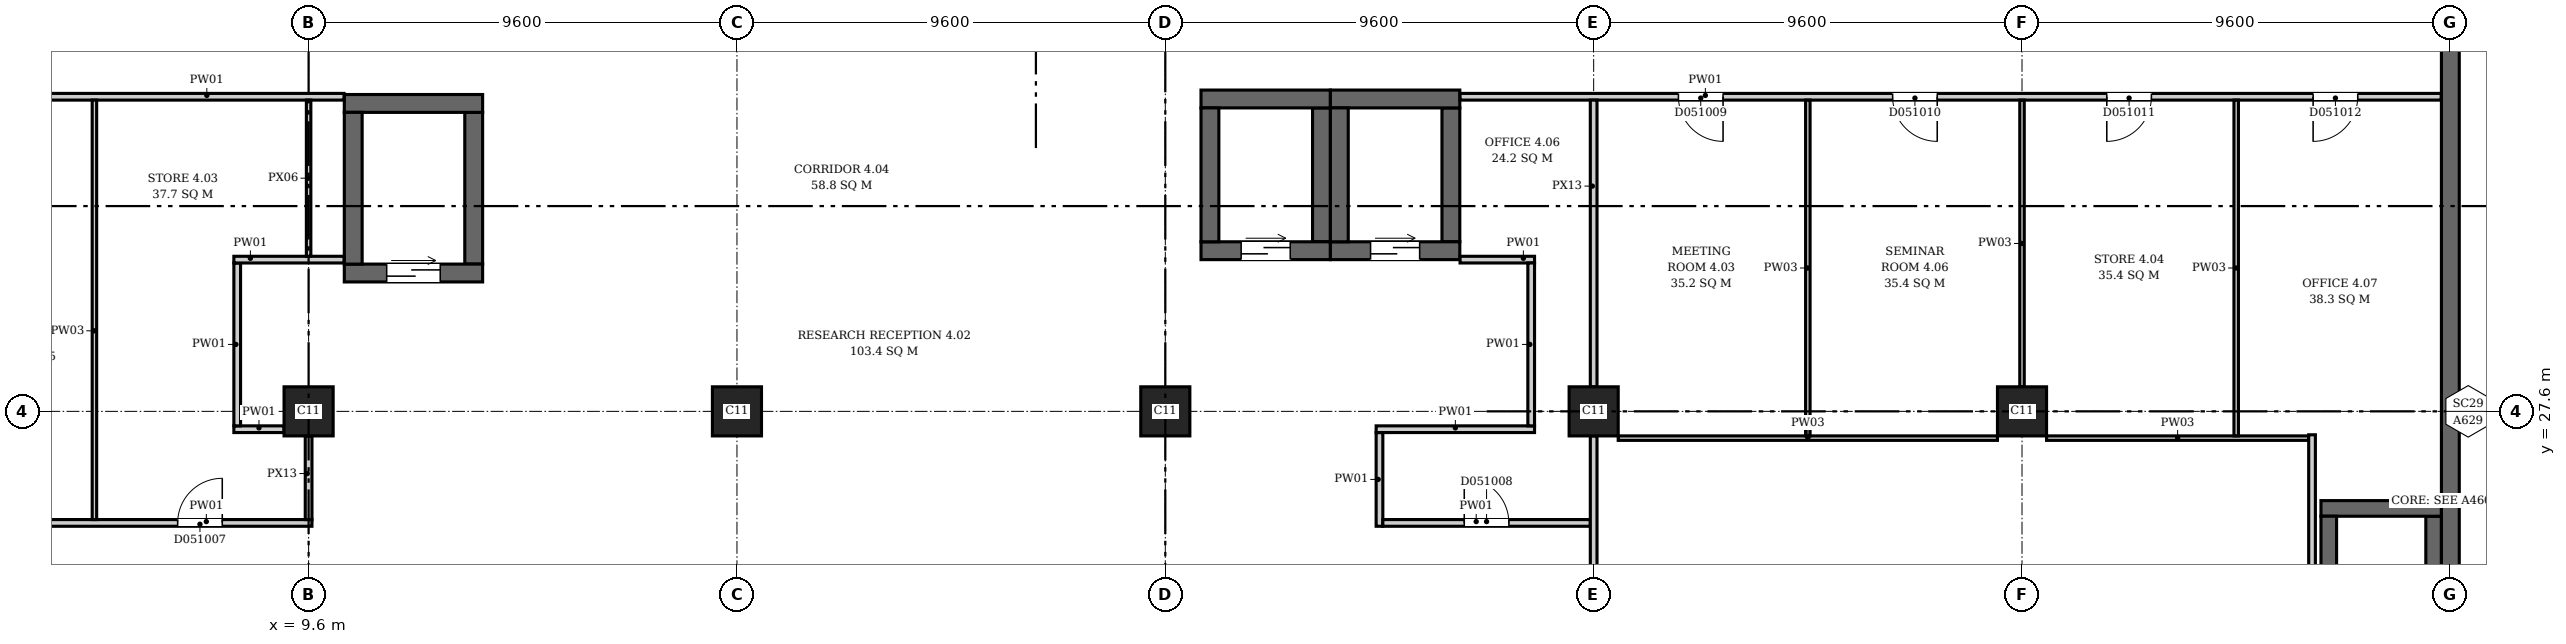
"""IFC4 building model, lengths in metres.
Left out: names, types, materials, properties, quantities, classifications, styles, units other than length and angle.
Written with IfcOpenShell. Run it as: python <this file> out.ifc"""

import sys

from ifc_helpers import new_model, si_unit, direction, frame, frame_2d, origin, origin_2d, place, context, subcontext, project, spatial, rectangle, extrude, element, fill, save


model = new_model("IFC4")
c1 = context("Model", 3, precision=1e-05, world=origin(), true_north=direction((0.0, 1.0)))
c2 = subcontext(c1, "Body", "Model", "MODEL_VIEW")
j1 = project(units=[si_unit("LENGTHUNIT", "METRE"), si_unit("PLANEANGLEUNIT", "RADIAN")], contexts=[c1])
p1 = place(None, origin())
s1 = spatial("IfcSite", under=j1, at=p1, CompositionType="ELEMENT")
p2 = place(p1, origin())
s2 = spatial("IfcBuilding", under=s1, at=p2, CompositionType="ELEMENT")
p3 = place(p2, frame((0.0, 0.0, 26.7)))
s3 = spatial("IfcBuildingStorey", under=s2, at=p3, CompositionType="ELEMENT", Elevation=26.7)
p4 = place(p3, frame((57.6, -0.2, 0.0), z_axis=(0.0, 0.0, 1.0), x_axis=(0.0, 1.0, 0.0)))
e1 = element("IfcWall", 1, at=p4, inside=s3, PredefinedType="SHEAR", context=c2, shape_type="SweptSolid", body=[
    extrude(rectangle(XDim=46.88, YDim=0.4, at=frame_2d((23.44, 0.0))), origin(), (0.0, 0.0, 1.0), 5.2),
])
p5 = place(p3, frame((54.7, 25.425, 0.0), z_axis=(0.0, 0.0, 1.0), x_axis=(1.0, 0.0, 0.0)))
e2 = element("IfcWall", 2, at=p5, inside=s3, PredefinedType="SHEAR", context=c2, shape_type="SweptSolid", body=[
    extrude(rectangle(XDim=2.7, YDim=0.35, at=frame_2d((1.35, 0.0))), origin(), (0.0, 0.0, 1.0), 5.2),
])
for number, where, z_axis, x_axis in (
    (3, (54.875, 21.75, 0.0), (0.0, 0.0, 1.0), (0.0, 1.0, 0.0)),
    (4, (57.225, 21.75, 0.0), (0.0, 0.0, 1.0), (0.0, 1.0, 0.0)),
):
    element("IfcWall", number, at=place(p3, frame(where, z_axis=z_axis, x_axis=x_axis)), inside=s3, PredefinedType="SHEAR", context=c2, shape_type="SweptSolid", body=[
        extrude(rectangle(XDim=3.5, YDim=0.35, at=frame_2d((1.75, 0.0))), origin(), (0.0, 0.0, 1.0), 5.2),
    ])
p6 = place(p3, frame((10.4, 30.7, 0.0), z_axis=(0.0, 0.0, 1.0), x_axis=(1.0, 0.0, 0.0)))
e5 = element("IfcWall", 5, at=p6, inside=s3, PredefinedType="SHEAR", context=c2, shape_type="SweptSolid", body=[
    extrude(rectangle(XDim=3.1, YDim=0.4, at=frame_2d((1.55, 0.0))), origin(), (0.0, 0.0, 1.0), 5.2),
])
p7 = place(p6, frame((0.95, 0.0, 0.0)))
e6 = element("IfcOpeningElement", 6, at=p7, cuts=e5, PredefinedType="OPENING", context=c2, shape_type="SweptSolid", body=[
    extrude(rectangle(XDim=1.2, YDim=2.1, at=frame_2d((0.6, 1.05))), frame((0.0, 0.21, 0.0), z_axis=(0.0, -1.0, 0.0), x_axis=(1.0, 0.0, 0.0)), (0.0, 0.0, 1.0), 0.42),
])
p8 = place(p3, frame((10.4, 34.5, 0.0), z_axis=(0.0, 0.0, 1.0), x_axis=(1.0, 0.0, 0.0)))
e7 = element("IfcWall", 7, at=p8, inside=s3, PredefinedType="SHEAR", context=c2, shape_type="SweptSolid", body=[
    extrude(rectangle(XDim=3.1, YDim=0.4, at=frame_2d((1.55, 0.0))), origin(), (0.0, 0.0, 1.0), 5.2),
])
for number, where, z_axis, x_axis in (
    (8, (10.6, 30.9, 0.0), (0.0, 0.0, 1.0), (0.0, 1.0, 0.0)),
    (9, (13.3, 30.9, 0.0), (0.0, 0.0, 1.0), (0.0, 1.0, 0.0)),
):
    element("IfcWall", number, at=place(p3, frame(where, z_axis=z_axis, x_axis=x_axis)), inside=s3, PredefinedType="SHEAR", context=c2, shape_type="SweptSolid", body=[
        extrude(rectangle(XDim=3.4, YDim=0.4, at=frame_2d((1.7, 0.0))), origin(), (0.0, 0.0, 1.0), 5.2),
    ])
p9 = place(p3, frame((29.6, 31.2, 0.0), z_axis=(0.0, 0.0, 1.0), x_axis=(1.0, 0.0, 0.0)))
e10 = element("IfcWall", 10, at=p9, inside=s3, PredefinedType="SHEAR", context=c2, shape_type="SweptSolid", body=[
    extrude(rectangle(XDim=2.9, YDim=0.4, at=frame_2d((1.45, 0.0))), origin(), (0.0, 0.0, 1.0), 5.2),
])
p10 = place(p9, frame((0.9, 0.0, 0.0)))
e11 = element("IfcOpeningElement", 11, at=p10, cuts=e10, PredefinedType="OPENING", context=c2, shape_type="SweptSolid", body=[
    extrude(rectangle(XDim=1.1, YDim=2.1, at=frame_2d((0.55, 1.05))), frame((0.0, 0.21, 0.0), z_axis=(0.0, -1.0, 0.0), x_axis=(1.0, 0.0, 0.0)), (0.0, 0.0, 1.0), 0.42),
])
p11 = place(p3, frame((29.6, 34.6, 0.0), z_axis=(0.0, 0.0, 1.0), x_axis=(1.0, 0.0, 0.0)))
e12 = element("IfcWall", 12, at=p11, inside=s3, PredefinedType="SHEAR", context=c2, shape_type="SweptSolid", body=[
    extrude(rectangle(XDim=2.9, YDim=0.4, at=frame_2d((1.45, 0.0))), origin(), (0.0, 0.0, 1.0), 5.2),
])
for number, where, z_axis, x_axis in (
    (13, (29.8, 31.4, 0.0), (0.0, 0.0, 1.0), (0.0, 1.0, 0.0)),
    (14, (32.3, 31.4, 0.0), (0.0, 0.0, 1.0), (0.0, 1.0, 0.0)),
):
    element("IfcWall", number, at=place(p3, frame(where, z_axis=z_axis, x_axis=x_axis)), inside=s3, PredefinedType="SHEAR", context=c2, shape_type="SweptSolid", body=[
        extrude(rectangle(XDim=3.0, YDim=0.4, at=frame_2d((1.5, 0.0))), origin(), (0.0, 0.0, 1.0), 5.2),
    ])
p12 = place(p3, frame((32.5, 31.2, 0.0), z_axis=(0.0, 0.0, 1.0), x_axis=(1.0, 0.0, 0.0)))
e15 = element("IfcWall", 15, at=p12, inside=s3, PredefinedType="SHEAR", context=c2, shape_type="SweptSolid", body=[
    extrude(rectangle(XDim=2.9, YDim=0.4, at=frame_2d((1.45, 0.0))), origin(), (0.0, 0.0, 1.0), 5.2),
])
p13 = place(p12, frame((0.9, 0.0, 0.0)))
e16 = element("IfcOpeningElement", 16, at=p13, cuts=e15, PredefinedType="OPENING", context=c2, shape_type="SweptSolid", body=[
    extrude(rectangle(XDim=1.1, YDim=2.1, at=frame_2d((0.55, 1.05))), frame((0.0, 0.21, 0.0), z_axis=(0.0, -1.0, 0.0), x_axis=(1.0, 0.0, 0.0)), (0.0, 0.0, 1.0), 0.42),
])
p14 = place(p3, frame((32.5, 34.6, 0.0), z_axis=(0.0, 0.0, 1.0), x_axis=(1.0, 0.0, 0.0)))
e17 = element("IfcWall", 17, at=p14, inside=s3, PredefinedType="SHEAR", context=c2, shape_type="SweptSolid", body=[
    extrude(rectangle(XDim=2.9, YDim=0.4, at=frame_2d((1.45, 0.0))), origin(), (0.0, 0.0, 1.0), 5.2),
])
for number, where, z_axis, x_axis in (
    (18, (32.7, 31.4, 0.0), (0.0, 0.0, 1.0), (0.0, 1.0, 0.0)),
    (19, (35.2, 31.4, 0.0), (0.0, 0.0, 1.0), (0.0, 1.0, 0.0)),
):
    element("IfcWall", number, at=place(p3, frame(where, z_axis=z_axis, x_axis=x_axis)), inside=s3, PredefinedType="SHEAR", context=c2, shape_type="SweptSolid", body=[
        extrude(rectangle(XDim=3.0, YDim=0.4, at=frame_2d((1.5, 0.0))), origin(), (0.0, 0.0, 1.0), 5.2),
    ])
for number, where, z_axis, x_axis in (
    (20, (9.6, 27.6, 0.0), (0.0, 0.0, 1.0), (1.0, 0.0, 0.0)),
    (21, (19.2, 27.6, 0.0), (0.0, 0.0, 1.0), (1.0, 0.0, 0.0)),
    (22, (28.8, 27.6, 0.0), (0.0, 0.0, 1.0), (1.0, 0.0, 0.0)),
    (23, (38.4, 27.6, 0.0), (0.0, 0.0, 1.0), (1.0, 0.0, 0.0)),
    (24, (48.0, 27.6, 0.0), (0.0, 0.0, 1.0), (1.0, 0.0, 0.0)),
):
    element("IfcColumn", number, at=place(p3, frame(where, z_axis=z_axis, x_axis=x_axis)), inside=s3, PredefinedType="COLUMN", context=c2, shape_type="SweptSolid", body=[
        extrude(rectangle(XDim=1.1, YDim=1.1, at=origin_2d()), origin(), (0.0, 0.0, 1.0), 5.2),
    ])
p15 = place(p3, frame((0.206, 25.1, 0.0), z_axis=(0.0, 0.0, 1.0), x_axis=(1.0, 0.0, 0.0)))
e25 = element("IfcWall", 25, at=p15, inside=s3, PredefinedType="PARTITIONING", context=c2, shape_type="SweptSolid", body=[
    extrude(rectangle(XDim=9.469, YDim=0.15, at=frame_2d((4.734, 0.0))), origin(), (0.0, 0.0, 1.0), 4.85),
])
p16 = place(p15, frame((1.869, 0.0, 0.0)))
e26 = element("IfcOpeningElement", 26, at=p16, cuts=e25, PredefinedType="OPENING", context=c2, shape_type="SweptSolid", body=[
    extrude(rectangle(XDim=1.0, YDim=2.1, at=frame_2d((0.5, 1.05))), frame((0.0, 0.085, 0.0), z_axis=(0.0, -1.0, 0.0), x_axis=(1.0, 0.0, 0.0)), (0.0, 0.0, 1.0), 0.17),
])
p17 = place(p15, frame((6.459, 0.0, 0.0)))
e27 = element("IfcOpeningElement", 27, at=p17, cuts=e25, PredefinedType="OPENING", context=c2, shape_type="SweptSolid", body=[
    extrude(rectangle(XDim=1.0, YDim=2.1, at=frame_2d((0.5, 1.05))), frame((0.0, 0.085, 0.0), z_axis=(0.0, -1.0, 0.0), x_axis=(1.0, 0.0, 0.0)), (0.0, 0.0, 1.0), 0.17),
])
p18 = place(p3, frame((2.706, 34.65, 0.0), z_axis=(0.0, 0.0, 1.0), x_axis=(1.0, 0.0, 0.0)))
e28 = element("IfcWall", 28, at=p18, inside=s3, PredefinedType="PARTITIONING", context=c2, shape_type="SweptSolid", body=[
    extrude(rectangle(XDim=7.688, YDim=0.15, at=frame_2d((3.844, 0.0))), origin(), (0.0, 0.0, 1.0), 4.85),
])
p19 = place(p3, frame((4.8, 25.175, 0.0), z_axis=(0.0, 0.0, 1.0), x_axis=(0.0, 1.0, 0.0)))
e29 = element("IfcWall", 29, at=p19, inside=s3, PredefinedType="PARTITIONING", context=c2, shape_type="SweptSolid", body=[
    extrude(rectangle(XDim=9.4, YDim=0.1, at=frame_2d((4.7, 0.0))), origin(), (0.0, 0.0, 1.0), 4.85),
])
p20 = place(p3, frame((7.925, 27.2, 0.0), z_axis=(0.0, 0.0, 1.0), x_axis=(1.0, 0.0, 0.0)))
e30 = element("IfcWall", 30, at=p20, inside=s3, PredefinedType="PARTITIONING", context=c2, shape_type="SweptSolid", body=[
    extrude(rectangle(XDim=1.125, YDim=0.15, at=frame_2d((0.562, 0.0))), origin(), (0.0, 0.0, 1.0), 4.85),
])
p21 = place(p3, frame((8.0, 27.275, 0.0), z_axis=(0.0, 0.0, 1.0), x_axis=(0.0, 1.0, 0.0)))
e31 = element("IfcWall", 31, at=p21, inside=s3, PredefinedType="PARTITIONING", context=c2, shape_type="SweptSolid", body=[
    extrude(rectangle(XDim=3.65, YDim=0.15, at=frame_2d((1.825, 0.0))), origin(), (0.0, 0.0, 1.0), 4.85),
])
p22 = place(p3, frame((7.925, 31.0, 0.0), z_axis=(0.0, 0.0, 1.0), x_axis=(1.0, 0.0, 0.0)))
e32 = element("IfcWall", 32, at=p22, inside=s3, PredefinedType="PARTITIONING", context=c2, shape_type="SweptSolid", body=[
    extrude(rectangle(XDim=2.469, YDim=0.15, at=frame_2d((1.234, 0.0))), origin(), (0.0, 0.0, 1.0), 4.85),
])
p23 = place(p3, frame((9.6, 25.175, 0.0), z_axis=(0.0, 0.0, 1.0), x_axis=(0.0, 1.0, 0.0)))
e33 = element("IfcWall", 33, at=p23, inside=s3, PredefinedType="PARTITIONING", context=c2, shape_type="SweptSolid", body=[
    extrude(rectangle(XDim=1.875, YDim=0.15, at=frame_2d((0.938, 0.0))), origin(), (0.0, 0.0, 1.0), 4.45),
])
p24 = place(p3, frame((9.6, 31.075, 0.0), z_axis=(0.0, 0.0, 1.0), x_axis=(0.0, 1.0, 0.0)))
e34 = element("IfcWall", 34, at=p24, inside=s3, PredefinedType="PARTITIONING", context=c2, shape_type="SweptSolid", body=[
    extrude(rectangle(XDim=3.5, YDim=0.1, at=frame_2d((1.75, 0.0))), origin(), (0.0, 0.0, 1.0), 4.45),
])
p25 = place(p3, frame((33.6, 25.025, 0.0), z_axis=(0.0, 0.0, 1.0), x_axis=(0.0, 1.0, 0.0)))
e35 = element("IfcWall", 35, at=p25, inside=s3, PredefinedType="PARTITIONING", context=c2, shape_type="SweptSolid", body=[
    extrude(rectangle(XDim=2.1, YDim=0.15, at=frame_2d((1.05, 0.0))), origin(), (0.0, 0.0, 1.0), 4.85),
])
p26 = place(p3, frame((33.525, 27.2, 0.0), z_axis=(0.0, 0.0, 1.0), x_axis=(1.0, 0.0, 0.0)))
e36 = element("IfcWall", 36, at=p26, inside=s3, PredefinedType="PARTITIONING", context=c2, shape_type="SweptSolid", body=[
    extrude(rectangle(XDim=3.55, YDim=0.15, at=frame_2d((1.775, 0.0))), origin(), (0.0, 0.0, 1.0), 4.85),
])
p27 = place(p3, frame((33.675, 25.1, 0.0), z_axis=(0.0, 0.0, 1.0), x_axis=(1.0, 0.0, 0.0)))
e37 = element("IfcWall", 37, at=p27, inside=s3, PredefinedType="PARTITIONING", context=c2, shape_type="SweptSolid", body=[
    extrude(rectangle(XDim=4.65, YDim=0.15, at=frame_2d((2.325, 0.0))), origin(), (0.0, 0.0, 1.0), 4.85),
])
p28 = place(p27, frame((1.825, 0.0, 0.0)))
e38 = element("IfcOpeningElement", 38, at=p28, cuts=e37, PredefinedType="OPENING", context=c2, shape_type="SweptSolid", body=[
    extrude(rectangle(XDim=1.0, YDim=2.1, at=frame_2d((0.5, 1.05))), frame((0.0, 0.085, 0.0), z_axis=(0.0, -1.0, 0.0), x_axis=(1.0, 0.0, 0.0)), (0.0, 0.0, 1.0), 0.17),
])
p29 = place(p3, frame((35.406, 31.0, 0.0), z_axis=(0.0, 0.0, 1.0), x_axis=(1.0, 0.0, 0.0)))
e39 = element("IfcWall", 39, at=p29, inside=s3, PredefinedType="PARTITIONING", context=c2, shape_type="SweptSolid", body=[
    extrude(rectangle(XDim=1.669, YDim=0.15, at=frame_2d((0.834, 0.0))), origin(), (0.0, 0.0, 1.0), 4.85),
])
p30 = place(p3, frame((35.406, 34.65, 0.0), z_axis=(0.0, 0.0, 1.0), x_axis=(1.0, 0.0, 0.0)))
e40 = element("IfcWall", 40, at=p30, inside=s3, PredefinedType="PARTITIONING", context=c2, shape_type="SweptSolid", body=[
    extrude(rectangle(XDim=21.988, YDim=0.15, at=frame_2d((10.994, 0.0))), origin(), (0.0, 0.0, 1.0), 4.85),
])
p31 = place(p30, frame((4.894, 0.0, 0.0)))
e41 = element("IfcOpeningElement", 41, at=p31, cuts=e40, PredefinedType="OPENING", context=c2, shape_type="SweptSolid", body=[
    extrude(rectangle(XDim=1.0, YDim=2.1, at=frame_2d((0.5, 1.05))), frame((0.0, 0.085, 0.0), z_axis=(0.0, -1.0, 0.0), x_axis=(1.0, 0.0, 0.0)), (0.0, 0.0, 1.0), 0.17),
])
p32 = place(p30, frame((9.694, 0.0, 0.0)))
e42 = element("IfcOpeningElement", 42, at=p32, cuts=e40, PredefinedType="OPENING", context=c2, shape_type="SweptSolid", body=[
    extrude(rectangle(XDim=1.0, YDim=2.1, at=frame_2d((0.5, 1.05))), frame((0.0, 0.085, 0.0), z_axis=(0.0, -1.0, 0.0), x_axis=(1.0, 0.0, 0.0)), (0.0, 0.0, 1.0), 0.17),
])
p33 = place(p30, frame((14.494, 0.0, 0.0)))
e43 = element("IfcOpeningElement", 43, at=p33, cuts=e40, PredefinedType="OPENING", context=c2, shape_type="SweptSolid", body=[
    extrude(rectangle(XDim=1.0, YDim=2.1, at=frame_2d((0.5, 1.05))), frame((0.0, 0.085, 0.0), z_axis=(0.0, -1.0, 0.0), x_axis=(1.0, 0.0, 0.0)), (0.0, 0.0, 1.0), 0.17),
])
p34 = place(p30, frame((19.118, 0.0, 0.0)))
e44 = element("IfcOpeningElement", 44, at=p34, cuts=e40, PredefinedType="OPENING", context=c2, shape_type="SweptSolid", body=[
    extrude(rectangle(XDim=1.0, YDim=2.1, at=frame_2d((0.5, 1.05))), frame((0.0, 0.085, 0.0), z_axis=(0.0, -1.0, 0.0), x_axis=(1.0, 0.0, 0.0)), (0.0, 0.0, 1.0), 0.17),
])
p35 = place(p3, frame((37.0, 27.275, 0.0), z_axis=(0.0, 0.0, 1.0), x_axis=(0.0, 1.0, 0.0)))
e45 = element("IfcWall", 45, at=p35, inside=s3, PredefinedType="PARTITIONING", context=c2, shape_type="SweptSolid", body=[
    extrude(rectangle(XDim=3.65, YDim=0.15, at=frame_2d((1.825, 0.0))), origin(), (0.0, 0.0, 1.0), 4.85),
])
p36 = place(p3, frame((38.4, 18.95, 0.0), z_axis=(0.0, 0.0, 1.0), x_axis=(0.0, 1.0, 0.0)))
e46 = element("IfcWall", 46, at=p36, inside=s3, PredefinedType="PARTITIONING", context=c2, shape_type="SweptSolid", body=[
    extrude(rectangle(XDim=8.1, YDim=0.15, at=frame_2d((4.05, 0.0))), origin(), (0.0, 0.0, 1.0), 4.45),
])
p37 = place(p36, frame((3.55, 0.0, 0.0)))
e47 = element("IfcOpeningElement", 47, at=p37, cuts=e46, PredefinedType="OPENING", context=c2, shape_type="SweptSolid", body=[
    extrude(rectangle(XDim=1.0, YDim=2.1, at=frame_2d((0.5, 1.05))), frame((0.0, 0.085, 0.0), z_axis=(0.0, -1.0, 0.0), x_axis=(1.0, 0.0, 0.0)), (0.0, 0.0, 1.0), 0.17),
])
p38 = place(p3, frame((38.4, 28.15, 0.0), z_axis=(0.0, 0.0, 1.0), x_axis=(0.0, 1.0, 0.0)))
e48 = element("IfcWall", 48, at=p38, inside=s3, PredefinedType="PARTITIONING", context=c2, shape_type="SweptSolid", body=[
    extrude(rectangle(XDim=6.425, YDim=0.15, at=frame_2d((3.212, 0.0))), origin(), (0.0, 0.0, 1.0), 4.45),
])
p39 = place(p3, frame((38.95, 27.0, 0.0), z_axis=(0.0, 0.0, 1.0), x_axis=(1.0, 0.0, 0.0)))
e49 = element("IfcWall", 49, at=p39, inside=s3, PredefinedType="PARTITIONING", context=c2, shape_type="SweptSolid", body=[
    extrude(rectangle(XDim=8.5, YDim=0.1, at=frame_2d((4.25, 0.0))), origin(), (0.0, 0.0, 1.0), 4.85),
])
p40 = place(p3, frame((43.2, 27.05, 0.0), z_axis=(0.0, 0.0, 1.0), x_axis=(0.0, 1.0, 0.0)))
e50 = element("IfcWall", 50, at=p40, inside=s3, PredefinedType="PARTITIONING", context=c2, shape_type="SweptSolid", body=[
    extrude(rectangle(XDim=7.525, YDim=0.1, at=frame_2d((3.762, 0.0))), origin(), (0.0, 0.0, 1.0), 4.85),
])
p41 = place(p3, frame((48.0, 28.15, 0.0), z_axis=(0.0, 0.0, 1.0), x_axis=(0.0, 1.0, 0.0)))
e51 = element("IfcWall", 51, at=p41, inside=s3, PredefinedType="PARTITIONING", context=c2, shape_type="SweptSolid", body=[
    extrude(rectangle(XDim=6.425, YDim=0.1, at=frame_2d((3.212, 0.0))), origin(), (0.0, 0.0, 1.0), 4.85),
])
p42 = place(p3, frame((48.55, 27.0, 0.0), z_axis=(0.0, 0.0, 1.0), x_axis=(1.0, 0.0, 0.0)))
e52 = element("IfcWall", 52, at=p42, inside=s3, PredefinedType="PARTITIONING", context=c2, shape_type="SweptSolid", body=[
    extrude(rectangle(XDim=5.875, YDim=0.1, at=frame_2d((2.938, 0.0))), origin(), (0.0, 0.0, 1.0), 4.85),
])
p43 = place(p3, frame((52.8, 27.05, 0.0), z_axis=(0.0, 0.0, 1.0), x_axis=(0.0, 1.0, 0.0)))
e53 = element("IfcWall", 53, at=p43, inside=s3, PredefinedType="PARTITIONING", context=c2, shape_type="SweptSolid", body=[
    extrude(rectangle(XDim=7.525, YDim=0.1, at=frame_2d((3.762, 0.0))), origin(), (0.0, 0.0, 1.0), 4.85),
])
p44 = place(p3, frame((54.5, 19.075, 0.0), z_axis=(0.0, 0.0, 1.0), x_axis=(0.0, 1.0, 0.0)))
e54 = element("IfcWall", 54, at=p44, inside=s3, PredefinedType="PARTITIONING", context=c2, shape_type="SweptSolid", body=[
    extrude(rectangle(XDim=8.0, YDim=0.15, at=frame_2d((4.0, 0.0))), origin(), (0.0, 0.0, 1.0), 4.85),
])
p45 = place(p7, origin())
e55 = element("IfcDoor", 55, at=p45, inside=s3, OperationType="DOUBLE_DOOR_SLIDING", PredefinedType="DOOR", context=c2, shape_type="SweptSolid", body=[
    extrude(rectangle(XDim=1.2, YDim=2.1, at=frame_2d((0.6, 1.05))), frame((0.0, 0.025, 0.0), z_axis=(0.0, -1.0, 0.0), x_axis=(1.0, 0.0, 0.0)), (0.0, 0.0, 1.0), 0.05),
])
fill(e6, e55)
p46 = place(p10, origin())
e56 = element("IfcDoor", 56, at=p46, inside=s3, OperationType="DOUBLE_DOOR_SLIDING", PredefinedType="DOOR", context=c2, shape_type="SweptSolid", body=[
    extrude(rectangle(XDim=1.1, YDim=2.1, at=frame_2d((0.55, 1.05))), frame((0.0, 0.025, 0.0), z_axis=(0.0, -1.0, 0.0), x_axis=(1.0, 0.0, 0.0)), (0.0, 0.0, 1.0), 0.05),
])
fill(e11, e56)
p47 = place(p13, origin())
e57 = element("IfcDoor", 57, at=p47, inside=s3, OperationType="DOUBLE_DOOR_SLIDING", PredefinedType="DOOR", context=c2, shape_type="SweptSolid", body=[
    extrude(rectangle(XDim=1.1, YDim=2.1, at=frame_2d((0.55, 1.05))), frame((0.0, 0.025, 0.0), z_axis=(0.0, -1.0, 0.0), x_axis=(1.0, 0.0, 0.0)), (0.0, 0.0, 1.0), 0.05),
])
fill(e16, e57)
p48 = place(p17, origin())
e58 = element("IfcDoor", 58, at=p48, inside=s3, OperationType="SINGLE_SWING_RIGHT", PredefinedType="DOOR", context=c2, shape_type="SweptSolid", body=[
    extrude(rectangle(XDim=1.0, YDim=2.1, at=frame_2d((0.5, 1.05))), frame((0.0, 0.025, 0.0), z_axis=(0.0, -1.0, 0.0), x_axis=(1.0, 0.0, 0.0)), (0.0, 0.0, 1.0), 0.05),
])
fill(e27, e58)
p49 = place(p28, origin())
e59 = element("IfcDoor", 59, at=p49, inside=s3, OperationType="SINGLE_SWING_LEFT", PredefinedType="DOOR", context=c2, shape_type="SweptSolid", body=[
    extrude(rectangle(XDim=1.0, YDim=2.1, at=frame_2d((0.5, 1.05))), frame((0.0, 0.025, 0.0), z_axis=(0.0, -1.0, 0.0), x_axis=(1.0, 0.0, 0.0)), (0.0, 0.0, 1.0), 0.05),
])
fill(e38, e59)
p50 = place(p31, origin())
e60 = element("IfcDoor", 60, at=p50, inside=s3, OperationType="SINGLE_SWING_RIGHT", PredefinedType="DOOR", context=c2, shape_type="SweptSolid", body=[
    extrude(rectangle(XDim=1.0, YDim=2.1, at=frame_2d((0.5, 1.05))), frame((0.0, 0.025, 0.0), z_axis=(0.0, -1.0, 0.0), x_axis=(1.0, 0.0, 0.0)), (0.0, 0.0, 1.0), 0.05),
])
fill(e41, e60)
p51 = place(p32, origin())
e61 = element("IfcDoor", 61, at=p51, inside=s3, OperationType="SINGLE_SWING_RIGHT", PredefinedType="DOOR", context=c2, shape_type="SweptSolid", body=[
    extrude(rectangle(XDim=1.0, YDim=2.1, at=frame_2d((0.5, 1.05))), frame((0.0, 0.025, 0.0), z_axis=(0.0, -1.0, 0.0), x_axis=(1.0, 0.0, 0.0)), (0.0, 0.0, 1.0), 0.05),
])
fill(e42, e61)
p52 = place(p33, origin())
e62 = element("IfcDoor", 62, at=p52, inside=s3, OperationType="SINGLE_SWING_LEFT", PredefinedType="DOOR", context=c2, shape_type="SweptSolid", body=[
    extrude(rectangle(XDim=1.0, YDim=2.1, at=frame_2d((0.5, 1.05))), frame((0.0, 0.025, 0.0), z_axis=(0.0, -1.0, 0.0), x_axis=(1.0, 0.0, 0.0)), (0.0, 0.0, 1.0), 0.05),
])
fill(e43, e62)
p53 = place(p34, origin())
e63 = element("IfcDoor", 63, at=p53, inside=s3, OperationType="SINGLE_SWING_LEFT", PredefinedType="DOOR", context=c2, shape_type="SweptSolid", body=[
    extrude(rectangle(XDim=1.0, YDim=2.1, at=frame_2d((0.5, 1.05))), frame((0.0, 0.025, 0.0), z_axis=(0.0, -1.0, 0.0), x_axis=(1.0, 0.0, 0.0)), (0.0, 0.0, 1.0), 0.05),
])
fill(e44, e63)
save(model, sys.argv[1])
